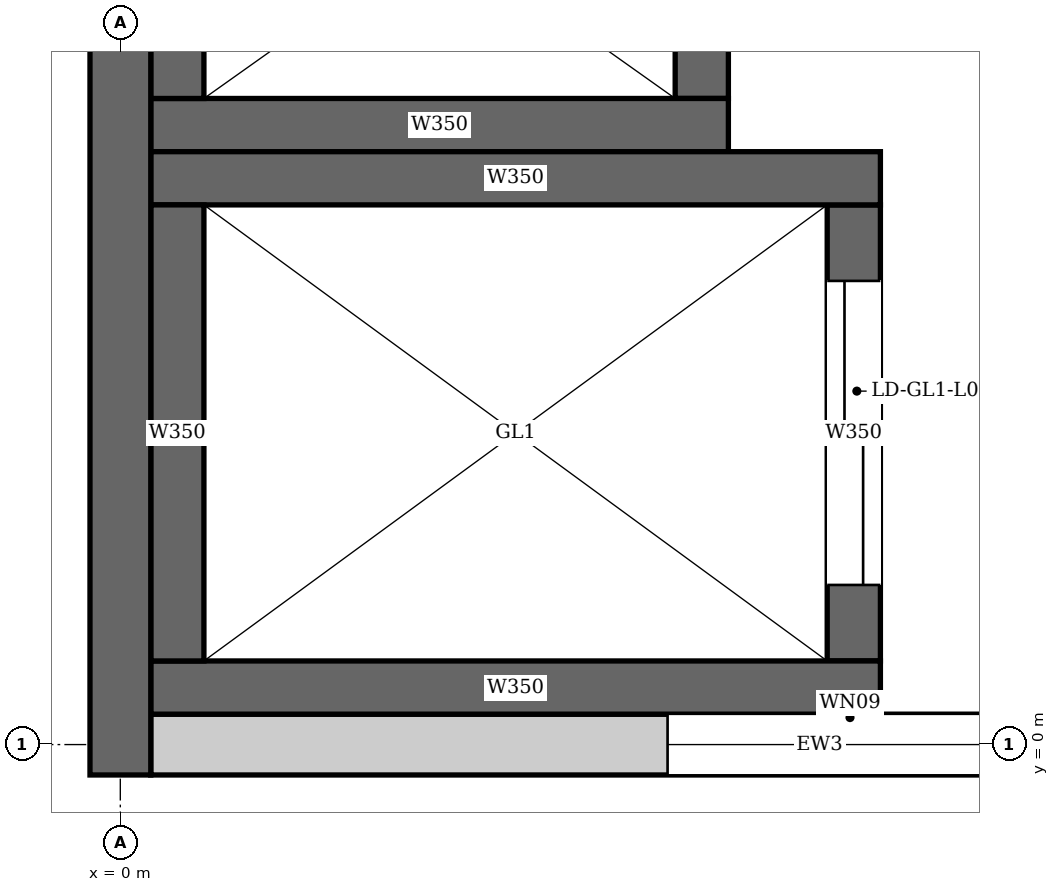
"""IFC4 building model, lengths in metres.
Left out: names, types, materials, properties, quantities, classifications, styles, units other than length and angle.
Written with IfcOpenShell. Run it as: python <this file> out.ifc"""

import sys

from ifc_helpers import new_model, si_unit, direction, frame, frame_2d, origin, place, context, subcontext, project, spatial, rectangle, extrude, element, fill, save


model = new_model("IFC4")
c1 = context("Model", 3, precision=1e-05, world=origin(), true_north=direction((0.0, 1.0)))
c2 = subcontext(c1, "Body", "Model", "MODEL_VIEW")
j1 = project(units=[si_unit("LENGTHUNIT", "METRE"), si_unit("PLANEANGLEUNIT", "RADIAN")], contexts=[c1])
p1 = place(None, origin())
s1 = spatial("IfcSite", under=j1, at=p1, CompositionType="ELEMENT")
p2 = place(p1, origin())
s2 = spatial("IfcBuilding", under=s1, at=p2, CompositionType="ELEMENT")
p3 = place(p2, frame((0.0, 0.0, 21.7)))
s3 = spatial("IfcBuildingStorey", under=s2, at=p3, CompositionType="ELEMENT", Elevation=21.7)
p4 = place(p3, frame((0.0, -0.2, 0.0), z_axis=(0.0, 0.0, 1.0), x_axis=(0.0, 1.0, 0.0)))
e1 = element("IfcWall", 1, at=p4, inside=s3, PredefinedType="SHEAR", context=c2, shape_type="SweptSolid", body=[
    extrude(rectangle(XDim=46.88, YDim=0.4, at=frame_2d((23.44, 0.0))), origin(), (0.0, 0.0, 1.0), 5.0),
])
for number, where, z_axis, x_axis in (
    (2, (0.2, 0.375, 0.0), (0.0, 0.0, 1.0), (1.0, 0.0, 0.0)),
    (3, (0.2, 3.725, 0.0), (0.0, 0.0, 1.0), (1.0, 0.0, 0.0)),
):
    element("IfcWall", number, at=place(p3, frame(where, z_axis=z_axis, x_axis=x_axis)), inside=s3, PredefinedType="SHEAR", context=c2, shape_type="SweptSolid", body=[
        extrude(rectangle(XDim=4.8, YDim=0.35, at=frame_2d((2.4, 0.0))), origin(), (0.0, 0.0, 1.0), 5.0),
    ])
p5 = place(p3, frame((0.375, 0.55, 0.0), z_axis=(0.0, 0.0, 1.0), x_axis=(0.0, 1.0, 0.0)))
e4 = element("IfcWall", 4, at=p5, inside=s3, PredefinedType="SHEAR", context=c2, shape_type="SweptSolid", body=[
    extrude(rectangle(XDim=3.0, YDim=0.35, at=frame_2d((1.5, 0.0))), origin(), (0.0, 0.0, 1.0), 5.0),
])
p6 = place(p3, frame((4.825, 0.55, 0.0), z_axis=(0.0, 0.0, 1.0), x_axis=(0.0, 1.0, 0.0)))
e5 = element("IfcWall", 5, at=p6, inside=s3, PredefinedType="SHEAR", context=c2, shape_type="SweptSolid", body=[
    extrude(rectangle(XDim=3.0, YDim=0.35, at=frame_2d((1.5, 0.0))), origin(), (0.0, 0.0, 1.0), 5.0),
])
p7 = place(p6, frame((0.5, 0.0, 0.0)))
e6 = element("IfcOpeningElement", 6, at=p7, cuts=e5, PredefinedType="OPENING", context=c2, shape_type="SweptSolid", body=[
    extrude(rectangle(XDim=2.0, YDim=2.4, at=frame_2d((1.0, 1.2))), frame((0.0, 0.185, 0.0), z_axis=(0.0, -1.0, 0.0), x_axis=(1.0, 0.0, 0.0)), (0.0, 0.0, 1.0), 0.37),
])
p8 = place(p3, frame((0.2, 4.075, 0.0), z_axis=(0.0, 0.0, 1.0), x_axis=(1.0, 0.0, 0.0)))
e7 = element("IfcWall", 7, at=p8, inside=s3, PredefinedType="SHEAR", context=c2, shape_type="SweptSolid", body=[
    extrude(rectangle(XDim=3.8, YDim=0.35, at=frame_2d((1.9, 0.0))), origin(), (0.0, 0.0, 1.0), 5.0),
])
p9 = place(p3, frame((0.375, 4.25, 0.0), z_axis=(0.0, 0.0, 1.0), x_axis=(0.0, 1.0, 0.0)))
e8 = element("IfcWall", 8, at=p9, inside=s3, PredefinedType="SHEAR", context=c2, shape_type="SweptSolid", body=[
    extrude(rectangle(XDim=2.2, YDim=0.35, at=frame_2d((1.1, 0.0))), origin(), (0.0, 0.0, 1.0), 5.0),
])
p10 = place(p3, frame((3.825, 4.25, 0.0), z_axis=(0.0, 0.0, 1.0), x_axis=(0.0, 1.0, 0.0)))
e9 = element("IfcWall", 9, at=p10, inside=s3, PredefinedType="SHEAR", context=c2, shape_type="SweptSolid", body=[
    extrude(rectangle(XDim=2.2, YDim=0.35, at=frame_2d((1.1, 0.0))), origin(), (0.0, 0.0, 1.0), 5.0),
])
p11 = place(p10, frame((0.55, 0.0, 0.0)))
e10 = element("IfcOpeningElement", 10, at=p11, cuts=e9, PredefinedType="OPENING", context=c2, shape_type="SweptSolid", body=[
    extrude(rectangle(XDim=1.1, YDim=2.1, at=frame_2d((0.55, 1.05))), frame((0.0, 0.185, 0.0), z_axis=(0.0, -1.0, 0.0), x_axis=(1.0, 0.0, 0.0)), (0.0, 0.0, 1.0), 0.37),
])
p12 = place(p3, frame((0.2, 0.0, 0.0), z_axis=(0.0, 0.0, 1.0), x_axis=(1.0, 0.0, 0.0)))
e11 = element("IfcWall", 11, at=p12, inside=s3, PredefinedType="ELEMENTEDWALL", context=c2, shape_type="SweptSolid", body=[
    extrude(rectangle(XDim=8.8, YDim=0.4, at=frame_2d((4.4, 0.0))), origin(), (0.0, 0.0, 1.0), 4.65),
])
p13 = place(p12, frame((3.4, 0.0, 1.0)))
e12 = element("IfcOpeningElement", 12, at=p13, cuts=e11, PredefinedType="OPENING", context=c2, shape_type="SweptSolid", body=[
    extrude(rectangle(XDim=2.4, YDim=2.2, at=frame_2d((1.2, 1.1))), frame((0.0, 0.21, 0.0), z_axis=(0.0, -1.0, 0.0), x_axis=(1.0, 0.0, 0.0)), (0.0, 0.0, 1.0), 0.42),
])
p14 = place(p13, origin())
e13 = element("IfcWindow", 13, at=p14, inside=s3, PartitioningType="SINGLE_PANEL", PredefinedType="WINDOW", context=c2, shape_type="SweptSolid", body=[
    extrude(rectangle(XDim=2.4, YDim=2.2, at=frame_2d((1.2, 1.1))), frame((0.0, 0.03, 0.0), z_axis=(0.0, -1.0, 0.0), x_axis=(1.0, 0.0, 0.0)), (0.0, 0.0, 1.0), 0.06),
])
fill(e12, e13)
p15 = place(p7, origin())
e14 = element("IfcDoor", 14, at=p15, inside=s3, OperationType="DOUBLE_DOOR_SLIDING", PredefinedType="DOOR", context=c2, shape_type="SweptSolid", body=[
    extrude(rectangle(XDim=2.0, YDim=2.4, at=frame_2d((1.0, 1.2))), frame((0.0, 0.025, 0.0), z_axis=(0.0, -1.0, 0.0), x_axis=(1.0, 0.0, 0.0)), (0.0, 0.0, 1.0), 0.05),
])
fill(e6, e14)
save(model, sys.argv[1])
